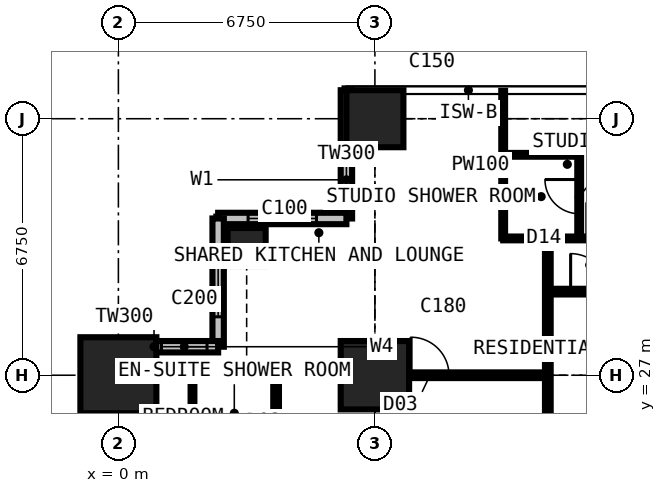
"""IFC4 building model, lengths in metres.
Left out: names, types, materials, properties, quantities, classifications, styles, units other than length and angle.
Written with IfcOpenShell. Run it as: python <this file> out.ifc"""

import sys

from ifc_helpers import new_model, si_unit, direction, frame, frame_2d, origin, origin_2d, place, context, subcontext, project, spatial, rectangle, extrude, element, fill, save


model = new_model("IFC4")
c1 = context("Model", 3, precision=1e-05, world=origin(), true_north=direction((0.0, 1.0)))
c2 = subcontext(c1, "Body", "Model", "MODEL_VIEW")
j1 = project(units=[si_unit("LENGTHUNIT", "METRE"), si_unit("PLANEANGLEUNIT", "RADIAN")], contexts=[c1])
p1 = place(None, origin())
s1 = spatial("IfcSite", under=j1, at=p1, CompositionType="ELEMENT")
p2 = place(p1, origin())
s2 = spatial("IfcBuilding", under=s1, at=p2, CompositionType="ELEMENT")
p3 = place(p2, frame((0.0, 0.0, 134.1)))
s3 = spatial("IfcBuildingStorey", under=s2, at=p3, CompositionType="ELEMENT", Elevation=134.1)
p4 = place(p3, frame((0.0, 27.0, 0.0), z_axis=(0.0, 0.0, 1.0), x_axis=(1.0, 0.0, 0.0)))
e1 = element("IfcColumn", 1, at=p4, inside=s3, PredefinedType="COLUMN", context=c2, shape_type="SweptSolid", body=[
    extrude(rectangle(XDim=2.0, YDim=2.0, at=origin_2d()), origin(), (0.0, 0.0, 1.0), 3.6),
])
p5 = place(p3, frame((3.375, 30.375, 0.0), z_axis=(0.0, 0.0, 1.0), x_axis=(1.0, 0.0, 0.0)))
e2 = element("IfcColumn", 2, at=p5, inside=s3, PredefinedType="COLUMN", context=c2, shape_type="SweptSolid", body=[
    extrude(rectangle(XDim=1.0, YDim=1.0, at=origin_2d()), origin(), (0.0, 0.0, 1.0), 3.6),
])
p6 = place(p3, frame((6.75, 27.0, 0.0), z_axis=(0.0, 0.0, 1.0), x_axis=(1.0, 0.0, 0.0)))
e3 = element("IfcColumn", 3, at=p6, inside=s3, PredefinedType="COLUMN", context=c2, shape_type="SweptSolid", body=[
    extrude(rectangle(XDim=1.8, YDim=1.8, at=origin_2d()), origin(), (0.0, 0.0, 1.0), 3.6),
])
p7 = place(p3, frame((6.75, 33.75, 0.0), z_axis=(0.0, 0.0, 1.0), x_axis=(1.0, 0.0, 0.0)))
e4 = element("IfcColumn", 4, at=p7, inside=s3, PredefinedType="COLUMN", context=c2, shape_type="SweptSolid", body=[
    extrude(rectangle(XDim=1.5, YDim=1.5, at=origin_2d()), origin(), (0.0, 0.0, 1.0), 3.6),
])
p8 = place(p3, frame((6.0, 34.5, 0.0), z_axis=(0.0, 0.0, 1.0), x_axis=(0.0, -1.0, 0.0)))
e5 = element("IfcWall", 5, at=p8, inside=s3, PredefinedType="SOLIDWALL", context=c2, shape_type="SweptSolid", body=[
    extrude(rectangle(XDim=3.375, YDim=0.3, at=frame_2d((1.688, 0.0))), origin(), (0.0, 0.0, 1.0), 3.3),
])
p9 = place(p8, frame((1.607, 0.0, 0.9)))
e6 = element("IfcOpeningElement", 6, at=p9, cuts=e5, PredefinedType="OPENING", context=c2, shape_type="SweptSolid", body=[
    extrude(rectangle(XDim=1.5, YDim=1.8, at=frame_2d((0.75, 0.9))), frame((0.0, 0.16, 0.0), z_axis=(0.0, -1.0, 0.0), x_axis=(1.0, 0.0, 0.0)), (0.0, 0.0, 1.0), 0.32),
])
p10 = place(p3, frame((6.0, 31.125, 0.0), z_axis=(0.0, 0.0, 1.0), x_axis=(-1.0, 0.0, 0.0)))
e7 = element("IfcWall", 7, at=p10, inside=s3, PredefinedType="SOLIDWALL", context=c2, shape_type="SweptSolid", body=[
    extrude(rectangle(XDim=3.375, YDim=0.3, at=frame_2d((1.688, 0.0))), origin(), (0.0, 0.0, 1.0), 3.3),
])
p11 = place(p10, frame((0.788, 0.0, 0.6)))
e8 = element("IfcOpeningElement", 8, at=p11, cuts=e7, PredefinedType="OPENING", context=c2, shape_type="SweptSolid", body=[
    extrude(rectangle(XDim=1.8, YDim=2.1, at=frame_2d((0.9, 1.05))), frame((0.0, 0.16, 0.0), z_axis=(0.0, -1.0, 0.0), x_axis=(1.0, 0.0, 0.0)), (0.0, 0.0, 1.0), 0.32),
])
p12 = place(p3, frame((2.625, 31.125, 0.0), z_axis=(0.0, 0.0, 1.0), x_axis=(0.0, -1.0, 0.0)))
e9 = element("IfcWall", 9, at=p12, inside=s3, PredefinedType="SOLIDWALL", context=c2, shape_type="SweptSolid", body=[
    extrude(rectangle(XDim=3.375, YDim=0.3, at=frame_2d((1.688, 0.0))), origin(), (0.0, 0.0, 1.0), 3.3),
])
p13 = place(p12, frame((0.788, 0.0, 0.6)))
e10 = element("IfcOpeningElement", 10, at=p13, cuts=e9, PredefinedType="OPENING", context=c2, shape_type="SweptSolid", body=[
    extrude(rectangle(XDim=1.8, YDim=2.1, at=frame_2d((0.9, 1.05))), frame((0.0, 0.16, 0.0), z_axis=(0.0, -1.0, 0.0), x_axis=(1.0, 0.0, 0.0)), (0.0, 0.0, 1.0), 0.32),
])
p14 = place(p3, frame((2.625, 27.75, 0.0), z_axis=(0.0, 0.0, 1.0), x_axis=(-1.0, 0.0, 0.0)))
e11 = element("IfcWall", 11, at=p14, inside=s3, PredefinedType="SOLIDWALL", context=c2, shape_type="SweptSolid", body=[
    extrude(rectangle(XDim=3.375, YDim=0.3, at=frame_2d((1.688, 0.0))), origin(), (0.0, 0.0, 1.0), 3.3),
])
p15 = place(p14, frame((0.292, 0.0, 0.9)))
e12 = element("IfcOpeningElement", 12, at=p15, cuts=e11, PredefinedType="OPENING", context=c2, shape_type="SweptSolid", body=[
    extrude(rectangle(XDim=1.2, YDim=1.8, at=frame_2d((0.6, 0.9))), frame((0.0, 0.16, 0.0), z_axis=(0.0, -1.0, 0.0), x_axis=(1.0, 0.0, 0.0)), (0.0, 0.0, 1.0), 0.32),
])
p16 = place(p3, frame((-0.734, 27.0, 0.0), z_axis=(0.0, 0.0, 1.0), x_axis=(1.0, 0.0, 0.0)))
e13 = element("IfcWall", 13, at=p16, inside=s3, PredefinedType="PARTITIONING", context=c2, shape_type="SweptSolid", body=[
    extrude(rectangle(XDim=12.034, YDim=0.15, at=frame_2d((6.017, 0.0))), origin(), (0.0, 0.0, 1.0), 2.802),
])
p17 = place(p16, frame((8.434, 0.0, 0.0)))
e14 = element("IfcOpeningElement", 14, at=p17, cuts=e13, PredefinedType="OPENING", context=c2, shape_type="SweptSolid", body=[
    extrude(rectangle(XDim=1.0, YDim=2.2, at=frame_2d((0.5, 1.1))), frame((0.0, 0.085, 0.0), z_axis=(0.0, -1.0, 0.0), x_axis=(1.0, 0.0, 0.0)), (0.0, 0.0, 1.0), 0.17),
])
p18 = place(p3, frame((1.95, 25.0, 0.0), z_axis=(0.0, 0.0, 1.0), x_axis=(0.0, 1.0, 0.0)))
e15 = element("IfcWall", 15, at=p18, inside=s3, PredefinedType="PARTITIONING", context=c2, shape_type="SweptSolid", body=[
    extrude(rectangle(XDim=2.0, YDim=0.1, at=frame_2d((1.0, 0.0))), origin(), (0.0, 0.0, 1.0), 3.3),
])
p19 = place(p3, frame((4.15, 10.125, 0.0), z_axis=(0.0, 0.0, 1.0), x_axis=(0.0, 1.0, 0.0)))
e16 = element("IfcWall", 16, at=p19, inside=s3, PredefinedType="PARTITIONING", context=c2, shape_type="SweptSolid", body=[
    extrude(rectangle(XDim=16.875, YDim=0.15, at=frame_2d((8.438, 0.0))), origin(), (0.0, 0.0, 1.0), 3.3),
])
p20 = place(p19, frame((13.7, 0.0, 0.0)))
e17 = element("IfcOpeningElement", 17, at=p20, cuts=e16, PredefinedType="OPENING", context=c2, shape_type="SweptSolid", body=[
    extrude(rectangle(XDim=0.95, YDim=2.2, at=frame_2d((0.475, 1.1))), frame((0.0, 0.085, 0.0), z_axis=(0.0, -1.0, 0.0), x_axis=(1.0, 0.0, 0.0)), (0.0, 0.0, 1.0), 0.17),
])
p21 = place(p19, frame((7.575, 0.0, 0.0)))
e18 = element("IfcOpeningElement", 18, at=p21, cuts=e16, PredefinedType="OPENING", context=c2, shape_type="SweptSolid", body=[
    extrude(rectangle(XDim=0.95, YDim=2.2, at=frame_2d((0.475, 1.1))), frame((0.0, 0.085, 0.0), z_axis=(0.0, -1.0, 0.0), x_axis=(1.0, 0.0, 0.0)), (0.0, 0.0, 1.0), 0.17),
])
p22 = place(p19, frame((0.2, 0.0, 0.0)))
e19 = element("IfcOpeningElement", 19, at=p22, cuts=e16, PredefinedType="OPENING", context=c2, shape_type="SweptSolid", body=[
    extrude(rectangle(XDim=0.95, YDim=2.2, at=frame_2d((0.475, 1.1))), frame((0.0, 0.085, 0.0), z_axis=(0.0, -1.0, 0.0), x_axis=(1.0, 0.0, 0.0)), (0.0, 0.0, 1.0), 0.17),
])
p23 = place(p19, frame((10.375, 0.0, 0.0)))
e20 = element("IfcOpeningElement", 20, at=p23, cuts=e16, PredefinedType="OPENING", context=c2, shape_type="SweptSolid", body=[
    extrude(rectangle(XDim=0.95, YDim=2.2, at=frame_2d((0.475, 1.1))), frame((0.0, 0.085, 0.0), z_axis=(0.0, -1.0, 0.0), x_axis=(1.0, 0.0, 0.0)), (0.0, 0.0, 1.0), 0.17),
])
p24 = place(p3, frame((10.125, 30.6, 0.0), z_axis=(0.0, 0.0, 1.0), x_axis=(0.0, 1.0, 0.0)))
e21 = element("IfcWall", 21, at=p24, inside=s3, PredefinedType="PARTITIONING", context=c2, shape_type="SweptSolid", body=[
    extrude(rectangle(XDim=3.884, YDim=0.1, at=frame_2d((1.942, 0.0))), origin(), (0.0, 0.0, 1.0), 3.3),
])
p25 = place(p3, frame((10.125, 30.6, 0.0), z_axis=(0.0, 0.0, 1.0), x_axis=(1.0, 0.0, 0.0)))
e22 = element("IfcWall", 22, at=p25, inside=s3, PredefinedType="PARTITIONING", context=c2, shape_type="SweptSolid", body=[
    extrude(rectangle(XDim=3.375, YDim=0.1, at=frame_2d((1.688, 0.0))), origin(), (0.0, 0.0, 1.0), 3.3),
])
p26 = place(p25, frame((2.2, 0.0, 0.0)))
e23 = element("IfcOpeningElement", 23, at=p26, cuts=e22, PredefinedType="OPENING", context=c2, shape_type="SweptSolid", body=[
    extrude(rectangle(XDim=0.95, YDim=2.2, at=frame_2d((0.475, 1.1))), frame((0.0, 0.06, 0.0), z_axis=(0.0, -1.0, 0.0), x_axis=(1.0, 0.0, 0.0)), (0.0, 0.0, 1.0), 0.12),
])
p27 = place(p3, frame((10.125, 32.8, 0.0), z_axis=(0.0, 0.0, 1.0), x_axis=(1.0, 0.0, 0.0)))
e24 = element("IfcWall", 24, at=p27, inside=s3, PredefinedType="PARTITIONING", context=c2, shape_type="SweptSolid", body=[
    extrude(rectangle(XDim=2.0, YDim=0.1, at=frame_2d((1.0, 0.0))), origin(), (0.0, 0.0, 1.0), 3.3),
])
p28 = place(p3, frame((11.3, 11.3, 0.0), z_axis=(0.0, 0.0, 1.0), x_axis=(0.0, 1.0, 0.0)))
e25 = element("IfcWall", 25, at=p28, inside=s3, PredefinedType="PARTITIONING", context=c2, shape_type="SweptSolid", body=[
    extrude(rectangle(XDim=19.3, YDim=0.15, at=frame_2d((9.65, 0.0))), origin(), (0.0, 0.0, 1.0), 3.3),
])
p29 = place(p28, frame((13.525, 0.0, 0.0)))
e26 = element("IfcOpeningElement", 26, at=p29, cuts=e25, PredefinedType="OPENING", context=c2, shape_type="SweptSolid", body=[
    extrude(rectangle(XDim=1.0, YDim=2.2, at=frame_2d((0.5, 1.1))), frame((0.0, 0.085, 0.0), z_axis=(0.0, -1.0, 0.0), x_axis=(1.0, 0.0, 0.0)), (0.0, 0.0, 1.0), 0.17),
])
p30 = place(p28, frame((10.438, 0.0, 0.0)))
e27 = element("IfcOpeningElement", 27, at=p30, cuts=e25, PredefinedType="OPENING", context=c2, shape_type="SweptSolid", body=[
    extrude(rectangle(XDim=1.0, YDim=2.2, at=frame_2d((0.5, 1.1))), frame((0.0, 0.085, 0.0), z_axis=(0.0, -1.0, 0.0), x_axis=(1.0, 0.0, 0.0)), (0.0, 0.0, 1.0), 0.17),
])
p31 = place(p3, frame((11.3, 29.2, 0.0), z_axis=(0.0, 0.0, 1.0), x_axis=(1.0, 0.0, 0.0)))
e28 = element("IfcWall", 28, at=p31, inside=s3, PredefinedType="PARTITIONING", context=c2, shape_type="SweptSolid", body=[
    extrude(rectangle(XDim=19.075, YDim=0.15, at=frame_2d((9.538, 0.0))), origin(), (0.0, 0.0, 1.0), 3.3),
])
p32 = place(p31, frame((5.825, 0.0, 0.0)))
e29 = element("IfcOpeningElement", 29, at=p32, cuts=e28, PredefinedType="OPENING", context=c2, shape_type="SweptSolid", body=[
    extrude(rectangle(XDim=0.95, YDim=2.2, at=frame_2d((0.475, 1.1))), frame((0.0, 0.085, 0.0), z_axis=(0.0, -1.0, 0.0), x_axis=(1.0, 0.0, 0.0)), (0.0, 0.0, 1.0), 0.17),
])
p33 = place(p31, frame((9.2, 0.0, 0.0)))
e30 = element("IfcOpeningElement", 30, at=p33, cuts=e28, PredefinedType="OPENING", context=c2, shape_type="SweptSolid", body=[
    extrude(rectangle(XDim=0.95, YDim=2.2, at=frame_2d((0.475, 1.1))), frame((0.0, 0.085, 0.0), z_axis=(0.0, -1.0, 0.0), x_axis=(1.0, 0.0, 0.0)), (0.0, 0.0, 1.0), 0.17),
])
p34 = place(p31, frame((0.6, 0.0, 0.0)))
e31 = element("IfcOpeningElement", 31, at=p34, cuts=e28, PredefinedType="OPENING", context=c2, shape_type="SweptSolid", body=[
    extrude(rectangle(XDim=1.0, YDim=2.2, at=frame_2d((0.5, 1.1))), frame((0.0, 0.085, 0.0), z_axis=(0.0, -1.0, 0.0), x_axis=(1.0, 0.0, 0.0)), (0.0, 0.0, 1.0), 0.17),
])
p35 = place(p3, frame((12.125, 30.6, 0.0), z_axis=(0.0, 0.0, 1.0), x_axis=(0.0, 1.0, 0.0)))
e32 = element("IfcWall", 32, at=p35, inside=s3, PredefinedType="PARTITIONING", context=c2, shape_type="SweptSolid", body=[
    extrude(rectangle(XDim=2.2, YDim=0.1, at=frame_2d((1.1, 0.0))), origin(), (0.0, 0.0, 1.0), 3.3),
])
p36 = place(p35, frame((0.65, 0.0, 0.0)))
e33 = element("IfcOpeningElement", 33, at=p36, cuts=e32, PredefinedType="OPENING", context=c2, shape_type="SweptSolid", body=[
    extrude(rectangle(XDim=0.9, YDim=2.2, at=frame_2d((0.45, 1.1))), frame((0.0, 0.06, 0.0), z_axis=(0.0, -1.0, 0.0), x_axis=(1.0, 0.0, 0.0)), (0.0, 0.0, 1.0), 0.12),
])
p37 = place(p9, origin())
e34 = element("IfcWindow", 34, at=p37, inside=s3, PartitioningType="SINGLE_PANEL", PredefinedType="WINDOW", context=c2, shape_type="SweptSolid", body=[
    extrude(rectangle(XDim=1.5, YDim=1.8, at=frame_2d((0.75, 0.9))), frame((0.0, 0.03, 0.0), z_axis=(0.0, -1.0, 0.0), x_axis=(1.0, 0.0, 0.0)), (0.0, 0.0, 1.0), 0.06),
])
fill(e6, e34)
p38 = place(p11, origin())
e35 = element("IfcWindow", 35, at=p38, inside=s3, PartitioningType="SINGLE_PANEL", PredefinedType="WINDOW", context=c2, shape_type="SweptSolid", body=[
    extrude(rectangle(XDim=1.8, YDim=2.1, at=frame_2d((0.9, 1.05))), frame((0.0, 0.03, 0.0), z_axis=(0.0, -1.0, 0.0), x_axis=(1.0, 0.0, 0.0)), (0.0, 0.0, 1.0), 0.06),
])
fill(e8, e35)
p39 = place(p13, origin())
e36 = element("IfcWindow", 36, at=p39, inside=s3, PartitioningType="SINGLE_PANEL", PredefinedType="WINDOW", context=c2, shape_type="SweptSolid", body=[
    extrude(rectangle(XDim=1.8, YDim=2.1, at=frame_2d((0.9, 1.05))), frame((0.0, 0.03, 0.0), z_axis=(0.0, -1.0, 0.0), x_axis=(1.0, 0.0, 0.0)), (0.0, 0.0, 1.0), 0.06),
])
fill(e10, e36)
p40 = place(p15, origin())
e37 = element("IfcWindow", 37, at=p40, inside=s3, PartitioningType="SINGLE_PANEL", PredefinedType="WINDOW", context=c2, shape_type="SweptSolid", body=[
    extrude(rectangle(XDim=1.2, YDim=1.8, at=frame_2d((0.6, 0.9))), frame((0.0, 0.03, 0.0), z_axis=(0.0, -1.0, 0.0), x_axis=(1.0, 0.0, 0.0)), (0.0, 0.0, 1.0), 0.06),
])
fill(e12, e37)
p41 = place(p36, origin())
e38 = element("IfcDoor", 38, at=p41, inside=s3, OperationType="SINGLE_SWING_RIGHT", PredefinedType="DOOR", context=c2, shape_type="SweptSolid", body=[
    extrude(rectangle(XDim=0.9, YDim=2.2, at=frame_2d((0.45, 1.1))), frame((0.0, 0.025, 0.0), z_axis=(0.0, -1.0, 0.0), x_axis=(1.0, 0.0, 0.0)), (0.0, 0.0, 1.0), 0.05),
])
fill(e33, e38)
p42 = place(p34, origin())
e39 = element("IfcDoor", 39, at=p42, inside=s3, OperationType="SINGLE_SWING_LEFT", PredefinedType="DOOR", context=c2, shape_type="SweptSolid", body=[
    extrude(rectangle(XDim=1.0, YDim=2.2, at=frame_2d((0.5, 1.1))), frame((0.0, 0.025, 0.0), z_axis=(0.0, -1.0, 0.0), x_axis=(1.0, 0.0, 0.0)), (0.0, 0.0, 1.0), 0.05),
])
fill(e31, e39)
p43 = place(p17, origin())
e40 = element("IfcDoor", 40, at=p43, inside=s3, OperationType="SINGLE_SWING_LEFT", PredefinedType="DOOR", context=c2, shape_type="SweptSolid", body=[
    extrude(rectangle(XDim=1.0, YDim=2.2, at=frame_2d((0.5, 1.1))), frame((0.0, 0.025, 0.0), z_axis=(0.0, -1.0, 0.0), x_axis=(1.0, 0.0, 0.0)), (0.0, 0.0, 1.0), 0.05),
])
fill(e14, e40)
save(model, sys.argv[1])
